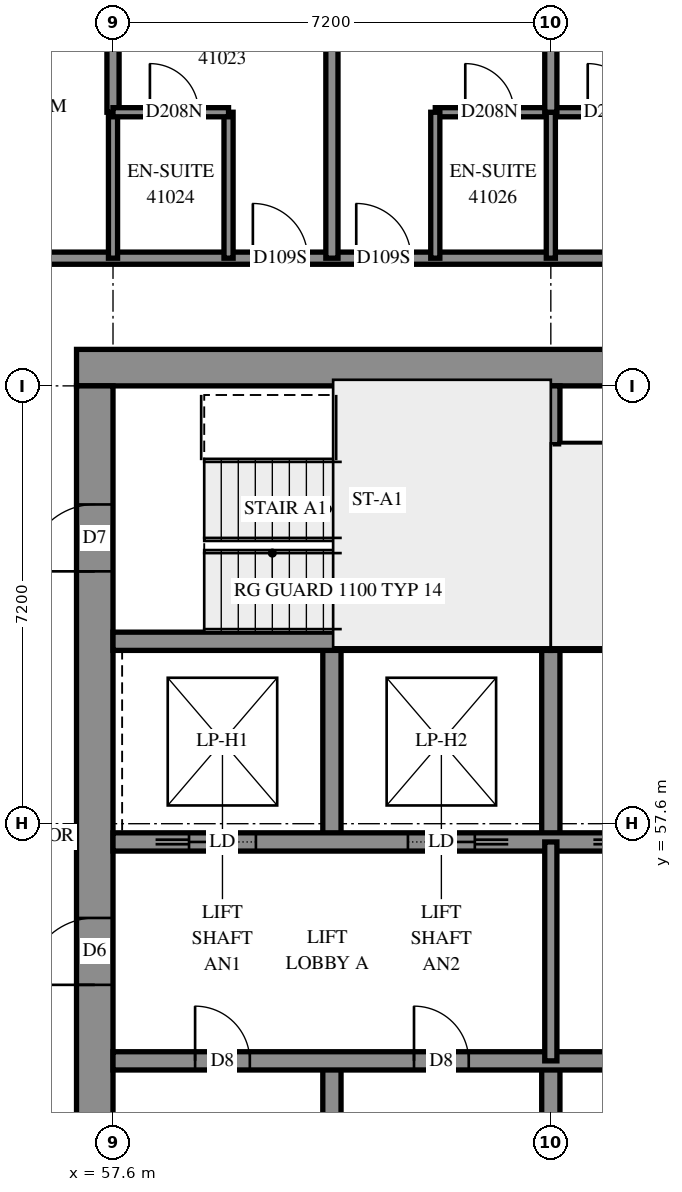
"""IFC4 building model, lengths in metres.
Left out: names, types, materials, properties, quantities, classifications, styles, units other than length and angle.
Written with IfcOpenShell. Run it as: python <this file> out.ifc"""

import sys

from ifc_helpers import new_model, si_unit, direction, frame, frame_2d, origin, place, context, subcontext, project, spatial, rectangle, extrude, element, fill, save


model = new_model("IFC4")
c1 = context("Model", 3, precision=1e-05, world=origin(), true_north=direction((0.0, 1.0)))
c2 = subcontext(c1, "Body", "Model", "MODEL_VIEW")
j1 = project(units=[si_unit("LENGTHUNIT", "METRE"), si_unit("PLANEANGLEUNIT", "RADIAN")], contexts=[c1])
p1 = place(None, origin())
s1 = spatial("IfcSite", under=j1, at=p1, CompositionType="ELEMENT")
p2 = place(p1, origin())
s2 = spatial("IfcBuilding", under=s1, at=p2, CompositionType="ELEMENT")
p3 = place(p2, frame((0.0, 0.0, 152.4)))
s3 = spatial("IfcBuildingStorey", under=s2, at=p3, CompositionType="ELEMENT", Elevation=152.4)
p4 = place(p3, frame((57.0, 65.1, -0.3), z_axis=(0.0, 0.0, 1.0), x_axis=(1.0, 0.0, 0.0)))
e1 = element("IfcWall", 1, at=p4, inside=s3, PredefinedType="SHEAR", context=c2, shape_type="SweptSolid", body=[
    extrude(rectangle(XDim=15.6, YDim=0.6, at=frame_2d((7.8, 0.0))), origin(), (0.0, 0.0, 1.0), 2.7),
])
p5 = place(p4, frame((10.6, 0.0, 0.3)))
e2 = element("IfcOpeningElement", 2, at=p5, cuts=e1, PredefinedType="OPENING", context=c2, shape_type="SweptSolid", body=[
    extrude(rectangle(XDim=0.8, YDim=2.1, at=frame_2d((0.4, 1.05))), frame((0.0, 0.31, 0.0), z_axis=(0.0, -1.0, 0.0), x_axis=(1.0, 0.0, 0.0)), (0.0, 0.0, 1.0), 0.62),
])
p6 = place(p3, frame((57.3, 50.4, -0.3), z_axis=(0.0, 0.0, 1.0), x_axis=(0.0, 1.0, 0.0)))
e3 = element("IfcWall", 3, at=p6, inside=s3, PredefinedType="SHEAR", context=c2, shape_type="SweptSolid", body=[
    extrude(rectangle(XDim=14.4, YDim=0.6, at=frame_2d((7.2, 0.0))), origin(), (0.0, 0.0, 1.0), 2.7),
])
p7 = place(p6, frame((4.55, 0.0, 0.3)))
e4 = element("IfcOpeningElement", 4, at=p7, cuts=e3, PredefinedType="OPENING", context=c2, shape_type="SweptSolid", body=[
    extrude(rectangle(XDim=1.1, YDim=2.1, at=frame_2d((0.55, 1.05))), frame((0.0, 0.31, 0.0), z_axis=(0.0, -1.0, 0.0), x_axis=(1.0, 0.0, 0.0)), (0.0, 0.0, 1.0), 0.62),
])
p8 = place(p6, frame((11.35, 0.0, 0.3)))
e5 = element("IfcOpeningElement", 5, at=p8, cuts=e3, PredefinedType="OPENING", context=c2, shape_type="SweptSolid", body=[
    extrude(rectangle(XDim=1.1, YDim=2.1, at=frame_2d((0.55, 1.05))), frame((0.0, 0.31, 0.0), z_axis=(0.0, -1.0, 0.0), x_axis=(1.0, 0.0, 0.0)), (0.0, 0.0, 1.0), 0.62),
])
for number, where, z_axis, x_axis in (
    (6, (61.2, 50.4, 0.0), (0.0, 0.0, 1.0), (0.0, 1.0, 0.0)),
    (7, (61.2, 57.3, 0.0), (0.0, 0.0, 1.0), (0.0, 1.0, 0.0)),
    (8, (64.8, 50.4, 0.0), (0.0, 0.0, 1.0), (0.0, 1.0, 0.0)),
    (9, (64.8, 57.3, 0.0), (0.0, 0.0, 1.0), (0.0, 1.0, 0.0)),
):
    element("IfcWall", number, at=place(p3, frame(where, z_axis=z_axis, x_axis=x_axis)), inside=s3, PredefinedType="SOLIDWALL", context=c2, shape_type="SweptSolid", body=[
        extrude(rectangle(XDim=3.3, YDim=0.3, at=frame_2d((1.65, 0.0))), origin(), (0.0, 0.0, 1.0), 3.1),
    ])
p9 = place(p3, frame((57.6, 53.7, 0.0), z_axis=(0.0, 0.0, 1.0), x_axis=(1.0, 0.0, 0.0)))
e10 = element("IfcWall", 10, at=p9, inside=s3, PredefinedType="SOLIDWALL", context=c2, shape_type="SweptSolid", body=[
    extrude(rectangle(XDim=14.4, YDim=0.3, at=frame_2d((7.2, 0.0))), origin(), (0.0, 0.0, 1.0), 3.1),
])
p10 = place(p9, frame((1.35, 0.0, 0.0)))
e11 = element("IfcOpeningElement", 11, at=p10, cuts=e10, PredefinedType="OPENING", context=c2, shape_type="SweptSolid", body=[
    extrude(rectangle(XDim=0.9, YDim=2.1, at=frame_2d((0.45, 1.05))), frame((0.0, 0.16, 0.0), z_axis=(0.0, -1.0, 0.0), x_axis=(1.0, 0.0, 0.0)), (0.0, 0.0, 1.0), 0.32),
])
p11 = place(p9, frame((4.95, 0.0, 0.0)))
e12 = element("IfcOpeningElement", 12, at=p11, cuts=e10, PredefinedType="OPENING", context=c2, shape_type="SweptSolid", body=[
    extrude(rectangle(XDim=0.9, YDim=2.1, at=frame_2d((0.45, 1.05))), frame((0.0, 0.16, 0.0), z_axis=(0.0, -1.0, 0.0), x_axis=(1.0, 0.0, 0.0)), (0.0, 0.0, 1.0), 0.32),
])
p12 = place(p9, frame((8.55, 0.0, 0.0)))
e13 = element("IfcOpeningElement", 13, at=p12, cuts=e10, PredefinedType="OPENING", context=c2, shape_type="SweptSolid", body=[
    extrude(rectangle(XDim=0.9, YDim=2.1, at=frame_2d((0.45, 1.05))), frame((0.0, 0.16, 0.0), z_axis=(0.0, -1.0, 0.0), x_axis=(1.0, 0.0, 0.0)), (0.0, 0.0, 1.0), 0.32),
])
p13 = place(p9, frame((12.05, 0.0, 0.0)))
e14 = element("IfcOpeningElement", 14, at=p13, cuts=e10, PredefinedType="OPENING", context=c2, shape_type="SweptSolid", body=[
    extrude(rectangle(XDim=1.1, YDim=2.1, at=frame_2d((0.55, 1.05))), frame((0.0, 0.16, 0.0), z_axis=(0.0, -1.0, 0.0), x_axis=(1.0, 0.0, 0.0)), (0.0, 0.0, 1.0), 0.32),
])
p14 = place(p3, frame((57.6, 57.3, 0.0), z_axis=(0.0, 0.0, 1.0), x_axis=(1.0, 0.0, 0.0)))
e15 = element("IfcWall", 15, at=p14, inside=s3, PredefinedType="SOLIDWALL", context=c2, shape_type="SweptSolid", body=[
    extrude(rectangle(XDim=14.4, YDim=0.3, at=frame_2d((7.2, 0.0))), origin(), (0.0, 0.0, 1.0), 3.1),
])
p15 = place(p14, frame((1.25, 0.0, 0.0)))
e16 = element("IfcOpeningElement", 16, at=p15, cuts=e15, PredefinedType="OPENING", context=c2, shape_type="SweptSolid", body=[
    extrude(rectangle(XDim=1.1, YDim=2.1, at=frame_2d((0.55, 1.05))), frame((0.0, 0.16, 0.0), z_axis=(0.0, -1.0, 0.0), x_axis=(1.0, 0.0, 0.0)), (0.0, 0.0, 1.0), 0.32),
])
p16 = place(p14, frame((4.85, 0.0, 0.0)))
e17 = element("IfcOpeningElement", 17, at=p16, cuts=e15, PredefinedType="OPENING", context=c2, shape_type="SweptSolid", body=[
    extrude(rectangle(XDim=1.1, YDim=2.1, at=frame_2d((0.55, 1.05))), frame((0.0, 0.16, 0.0), z_axis=(0.0, -1.0, 0.0), x_axis=(1.0, 0.0, 0.0)), (0.0, 0.0, 1.0), 0.32),
])
p17 = place(p14, frame((8.45, 0.0, 0.0)))
e18 = element("IfcOpeningElement", 18, at=p17, cuts=e15, PredefinedType="OPENING", context=c2, shape_type="SweptSolid", body=[
    extrude(rectangle(XDim=1.1, YDim=2.1, at=frame_2d((0.55, 1.05))), frame((0.0, 0.16, 0.0), z_axis=(0.0, -1.0, 0.0), x_axis=(1.0, 0.0, 0.0)), (0.0, 0.0, 1.0), 0.32),
])
p18 = place(p14, frame((12.05, 0.0, 0.0)))
e19 = element("IfcOpeningElement", 19, at=p18, cuts=e15, PredefinedType="OPENING", context=c2, shape_type="SweptSolid", body=[
    extrude(rectangle(XDim=1.1, YDim=2.1, at=frame_2d((0.55, 1.05))), frame((0.0, 0.16, 0.0), z_axis=(0.0, -1.0, 0.0), x_axis=(1.0, 0.0, 0.0)), (0.0, 0.0, 1.0), 0.32),
])
for number, where, z_axis, x_axis in (
    (20, (57.6, 60.6, 0.0), (0.0, 0.0, 1.0), (1.0, 0.0, 0.0)),
    (21, (64.8, 60.6, 0.0), (0.0, 0.0, 1.0), (1.0, 0.0, 0.0)),
):
    element("IfcWall", number, at=place(p3, frame(where, z_axis=z_axis, x_axis=x_axis)), inside=s3, PredefinedType="SOLIDWALL", context=c2, shape_type="SweptSolid", body=[
        extrude(rectangle(XDim=7.2, YDim=0.3, at=frame_2d((3.6, 0.0))), origin(), (0.0, 0.0, 1.0), 3.1),
    ])
p19 = place(p3, frame((64.8, 60.6, 0.0), z_axis=(0.0, 0.0, 1.0), x_axis=(0.0, 1.0, 0.0)))
e22 = element("IfcWall", 22, at=p19, inside=s3, PredefinedType="SOLIDWALL", context=c2, shape_type="SweptSolid", body=[
    extrude(rectangle(XDim=4.2, YDim=0.3, at=frame_2d((2.1, 0.0))), origin(), (0.0, 0.0, 1.0), 3.1),
])
p20 = place(p3, frame((64.95, 63.78, 0.0), z_axis=(0.0, 0.0, 1.0), x_axis=(1.0, 0.0, 0.0)))
e23 = element("IfcWall", 23, at=p20, inside=s3, PredefinedType="PARTITIONING", context=c2, shape_type="SweptSolid", body=[
    extrude(rectangle(XDim=6.9, YDim=0.15, at=frame_2d((3.45, 0.0))), origin(), (0.0, 0.0, 1.0), 3.1),
])
p21 = place(p3, frame((64.8, 53.7, 0.0), z_axis=(0.0, 0.0, 1.0), x_axis=(0.0, 1.0, 0.0)))
e24 = element("IfcWall", 24, at=p21, inside=s3, PredefinedType="PARTITIONING", context=c2, shape_type="SweptSolid", body=[
    extrude(rectangle(XDim=3.6, YDim=0.2, at=frame_2d((1.8, 0.0))), origin(), (0.0, 0.0, 1.0), 3.1),
])
p22 = place(p3, frame((55.5, 66.9, 0.0), z_axis=(0.0, 0.0, 1.0), x_axis=(1.0, 0.0, 0.0)))
e25 = element("IfcWall", 25, at=p22, inside=s3, PredefinedType="PARTITIONING", context=c2, shape_type="SweptSolid", body=[
    extrude(rectangle(XDim=18.6, YDim=0.2, at=frame_2d((9.3, 0.0))), origin(), (0.0, 0.0, 1.0), 3.1),
])
p23 = place(p22, frame((4.4, 0.0, 0.0)))
e26 = element("IfcOpeningElement", 26, at=p23, cuts=e25, PredefinedType="OPENING", context=c2, shape_type="SweptSolid", body=[
    extrude(rectangle(XDim=0.9, YDim=2.1, at=frame_2d((0.45, 1.05))), frame((0.0, 0.11, 0.0), z_axis=(0.0, -1.0, 0.0), x_axis=(1.0, 0.0, 0.0)), (0.0, 0.0, 1.0), 0.22),
])
p24 = place(p22, frame((6.1, 0.0, 0.0)))
e27 = element("IfcOpeningElement", 27, at=p24, cuts=e25, PredefinedType="OPENING", context=c2, shape_type="SweptSolid", body=[
    extrude(rectangle(XDim=0.9, YDim=2.1, at=frame_2d((0.45, 1.05))), frame((0.0, 0.11, 0.0), z_axis=(0.0, -1.0, 0.0), x_axis=(1.0, 0.0, 0.0)), (0.0, 0.0, 1.0), 0.22),
])
p25 = place(p22, frame((11.65, 0.0, 0.0)))
e28 = element("IfcOpeningElement", 28, at=p25, cuts=e25, PredefinedType="OPENING", context=c2, shape_type="SweptSolid", body=[
    extrude(rectangle(XDim=0.9, YDim=2.1, at=frame_2d((0.45, 1.05))), frame((0.0, 0.11, 0.0), z_axis=(0.0, -1.0, 0.0), x_axis=(1.0, 0.0, 0.0)), (0.0, 0.0, 1.0), 0.22),
])
p26 = place(p22, frame((13.3, 0.0, 0.0)))
e29 = element("IfcOpeningElement", 29, at=p26, cuts=e25, PredefinedType="OPENING", context=c2, shape_type="SweptSolid", body=[
    extrude(rectangle(XDim=0.9, YDim=2.1, at=frame_2d((0.45, 1.05))), frame((0.0, 0.11, 0.0), z_axis=(0.0, -1.0, 0.0), x_axis=(1.0, 0.0, 0.0)), (0.0, 0.0, 1.0), 0.22),
])
p27 = place(p3, frame((61.2, 66.9, 0.0), z_axis=(0.0, 0.0, 1.0), x_axis=(0.0, 1.0, 0.0)))
e30 = element("IfcWall", 30, at=p27, inside=s3, PredefinedType="PARTITIONING", context=c2, shape_type="SweptSolid", body=[
    extrude(rectangle(XDim=5.804, YDim=0.2, at=frame_2d((2.902, 0.0))), origin(), (0.0, 0.0, 1.0), 3.1),
])
p28 = place(p3, frame((62.9, 69.3, 0.0), z_axis=(0.0, 0.0, 1.0), x_axis=(1.0, 0.0, 0.0)))
e31 = element("IfcWall", 31, at=p28, inside=s3, PredefinedType="PARTITIONING", context=c2, shape_type="SweptSolid", body=[
    extrude(rectangle(XDim=3.8, YDim=0.15, at=frame_2d((1.9, 0.0))), origin(), (0.0, 0.0, 1.0), 3.1),
])
p29 = place(p28, frame((0.493, 0.0, 0.0)))
e32 = element("IfcOpeningElement", 32, at=p29, cuts=e31, PredefinedType="OPENING", context=c2, shape_type="SweptSolid", body=[
    extrude(rectangle(XDim=0.8, YDim=2.1, at=frame_2d((0.4, 1.05))), frame((0.0, 0.085, 0.0), z_axis=(0.0, -1.0, 0.0), x_axis=(1.0, 0.0, 0.0)), (0.0, 0.0, 1.0), 0.17),
])
p30 = place(p28, frame((2.507, 0.0, 0.0)))
e33 = element("IfcOpeningElement", 33, at=p30, cuts=e31, PredefinedType="OPENING", context=c2, shape_type="SweptSolid", body=[
    extrude(rectangle(XDim=0.8, YDim=2.1, at=frame_2d((0.4, 1.05))), frame((0.0, 0.085, 0.0), z_axis=(0.0, -1.0, 0.0), x_axis=(1.0, 0.0, 0.0)), (0.0, 0.0, 1.0), 0.17),
])
for number, where, z_axis, x_axis in (
    (34, (59.5, 66.9, 0.0), (0.0, 0.0, 1.0), (0.0, 1.0, 0.0)),
    (35, (57.6, 66.9, 0.0), (0.0, 0.0, 1.0), (0.0, 1.0, 0.0)),
    (36, (62.9, 66.9, 0.0), (0.0, 0.0, 1.0), (0.0, 1.0, 0.0)),
    (37, (64.8, 66.9, 0.0), (0.0, 0.0, 1.0), (0.0, 1.0, 0.0)),
):
    element("IfcWall", number, at=place(p3, frame(where, z_axis=z_axis, x_axis=x_axis)), inside=s3, PredefinedType="PARTITIONING", context=c2, shape_type="SweptSolid", body=[
        extrude(rectangle(XDim=2.4, YDim=0.15, at=frame_2d((1.2, 0.0))), origin(), (0.0, 0.0, 1.0), 3.1),
    ])
p31 = place(p3, frame((64.8, 69.3, 0.0), z_axis=(0.0, 0.0, 1.0), x_axis=(0.0, 1.0, 0.0)))
e38 = element("IfcWall", 38, at=p31, inside=s3, PredefinedType="PARTITIONING", context=c2, shape_type="SweptSolid", body=[
    extrude(rectangle(XDim=2.25, YDim=0.2, at=frame_2d((1.125, 0.0))), origin(), (0.0, 0.0, 1.0), 3.1),
])
p32 = place(p3, frame((57.6, 69.3, 0.0), z_axis=(0.0, 0.0, 1.0), x_axis=(0.0, 1.0, 0.0)))
e39 = element("IfcWall", 39, at=p32, inside=s3, PredefinedType="PARTITIONING", context=c2, shape_type="SweptSolid", body=[
    extrude(rectangle(XDim=2.146, YDim=0.2, at=frame_2d((1.073, 0.0))), origin(), (0.0, 0.0, 1.0), 3.1),
])
p33 = place(p3, frame((57.6, 69.3, 0.0), z_axis=(0.0, 0.0, 1.0), x_axis=(1.0, 0.0, 0.0)))
e40 = element("IfcWall", 40, at=p33, inside=s3, PredefinedType="PARTITIONING", context=c2, shape_type="SweptSolid", body=[
    extrude(rectangle(XDim=1.9, YDim=0.15, at=frame_2d((0.95, 0.0))), origin(), (0.0, 0.0, 1.0), 3.1),
])
p34 = place(p33, frame((0.607, 0.0, 0.0)))
e41 = element("IfcOpeningElement", 41, at=p34, cuts=e40, PredefinedType="OPENING", context=c2, shape_type="SweptSolid", body=[
    extrude(rectangle(XDim=0.8, YDim=2.1, at=frame_2d((0.4, 1.05))), frame((0.0, 0.085, 0.0), z_axis=(0.0, -1.0, 0.0), x_axis=(1.0, 0.0, 0.0)), (0.0, 0.0, 1.0), 0.17),
])
p35 = place(p7, origin())
e42 = element("IfcDoor", 42, at=p35, inside=s3, OperationType="DOUBLE_DOOR_SINGLE_SWING", PredefinedType="DOOR", context=c2, shape_type="SweptSolid", body=[
    extrude(rectangle(XDim=1.1, YDim=2.1, at=frame_2d((0.55, 1.05))), frame((0.0, 0.025, 0.0), z_axis=(0.0, -1.0, 0.0), x_axis=(1.0, 0.0, 0.0)), (0.0, 0.0, 1.0), 0.05),
])
fill(e4, e42)
p36 = place(p8, origin())
e43 = element("IfcDoor", 43, at=p36, inside=s3, OperationType="SINGLE_SWING_LEFT", PredefinedType="DOOR", context=c2, shape_type="SweptSolid", body=[
    extrude(rectangle(XDim=1.1, YDim=2.1, at=frame_2d((0.55, 1.05))), frame((0.0, 0.025, 0.0), z_axis=(0.0, -1.0, 0.0), x_axis=(1.0, 0.0, 0.0)), (0.0, 0.0, 1.0), 0.05),
])
fill(e5, e43)
p37 = place(p10, origin())
e44 = element("IfcDoor", 44, at=p37, inside=s3, OperationType="SINGLE_SWING_LEFT", PredefinedType="DOOR", context=c2, shape_type="SweptSolid", body=[
    extrude(rectangle(XDim=0.9, YDim=2.1, at=frame_2d((0.45, 1.05))), frame((0.0, 0.025, 0.0), z_axis=(0.0, -1.0, 0.0), x_axis=(1.0, 0.0, 0.0)), (0.0, 0.0, 1.0), 0.05),
])
fill(e11, e44)
p38 = place(p11, origin())
e45 = element("IfcDoor", 45, at=p38, inside=s3, OperationType="SINGLE_SWING_LEFT", PredefinedType="DOOR", context=c2, shape_type="SweptSolid", body=[
    extrude(rectangle(XDim=0.9, YDim=2.1, at=frame_2d((0.45, 1.05))), frame((0.0, 0.025, 0.0), z_axis=(0.0, -1.0, 0.0), x_axis=(1.0, 0.0, 0.0)), (0.0, 0.0, 1.0), 0.05),
])
fill(e12, e45)
p39 = place(p15, origin())
e46 = element("IfcDoor", 46, at=p39, inside=s3, OperationType="SLIDING_TO_LEFT", PredefinedType="DOOR", context=c2, shape_type="SweptSolid", body=[
    extrude(rectangle(XDim=1.1, YDim=2.1, at=frame_2d((0.55, 1.05))), frame((0.0, 0.025, 0.0), z_axis=(0.0, -1.0, 0.0), x_axis=(1.0, 0.0, 0.0)), (0.0, 0.0, 1.0), 0.05),
])
fill(e16, e46)
p40 = place(p16, origin())
e47 = element("IfcDoor", 47, at=p40, inside=s3, OperationType="SLIDING_TO_RIGHT", PredefinedType="DOOR", context=c2, shape_type="SweptSolid", body=[
    extrude(rectangle(XDim=1.1, YDim=2.1, at=frame_2d((0.55, 1.05))), frame((0.0, 0.025, 0.0), z_axis=(0.0, -1.0, 0.0), x_axis=(1.0, 0.0, 0.0)), (0.0, 0.0, 1.0), 0.05),
])
fill(e17, e47)
p41 = place(p23, origin())
e48 = element("IfcDoor", 48, at=p41, inside=s3, OperationType="SINGLE_SWING_RIGHT", PredefinedType="DOOR", context=c2, shape_type="SweptSolid", body=[
    extrude(rectangle(XDim=0.9, YDim=2.1, at=frame_2d((0.45, 1.05))), frame((0.0, 0.025, 0.0), z_axis=(0.0, -1.0, 0.0), x_axis=(1.0, 0.0, 0.0)), (0.0, 0.0, 1.0), 0.05),
])
fill(e26, e48)
p42 = place(p34, origin())
e49 = element("IfcDoor", 49, at=p42, inside=s3, OperationType="SINGLE_SWING_RIGHT", PredefinedType="DOOR", context=c2, shape_type="SweptSolid", body=[
    extrude(rectangle(XDim=0.8, YDim=2.1, at=frame_2d((0.4, 1.05))), frame((0.0, 0.025, 0.0), z_axis=(0.0, -1.0, 0.0), x_axis=(1.0, 0.0, 0.0)), (0.0, 0.0, 1.0), 0.05),
])
fill(e41, e49)
p43 = place(p24, origin())
e50 = element("IfcDoor", 50, at=p43, inside=s3, OperationType="SINGLE_SWING_LEFT", PredefinedType="DOOR", context=c2, shape_type="SweptSolid", body=[
    extrude(rectangle(XDim=0.9, YDim=2.1, at=frame_2d((0.45, 1.05))), frame((0.0, 0.025, 0.0), z_axis=(0.0, -1.0, 0.0), x_axis=(1.0, 0.0, 0.0)), (0.0, 0.0, 1.0), 0.05),
])
fill(e27, e50)
p44 = place(p29, origin())
e51 = element("IfcDoor", 51, at=p44, inside=s3, OperationType="SINGLE_SWING_RIGHT", PredefinedType="DOOR", context=c2, shape_type="SweptSolid", body=[
    extrude(rectangle(XDim=0.8, YDim=2.1, at=frame_2d((0.4, 1.05))), frame((0.0, 0.025, 0.0), z_axis=(0.0, -1.0, 0.0), x_axis=(1.0, 0.0, 0.0)), (0.0, 0.0, 1.0), 0.05),
])
fill(e32, e51)
p45 = place(p30, origin())
e52 = element("IfcDoor", 52, at=p45, inside=s3, OperationType="SINGLE_SWING_RIGHT", PredefinedType="DOOR", context=c2, shape_type="SweptSolid", body=[
    extrude(rectangle(XDim=0.8, YDim=2.1, at=frame_2d((0.4, 1.05))), frame((0.0, 0.025, 0.0), z_axis=(0.0, -1.0, 0.0), x_axis=(1.0, 0.0, 0.0)), (0.0, 0.0, 1.0), 0.05),
])
fill(e33, e52)
save(model, sys.argv[1])
